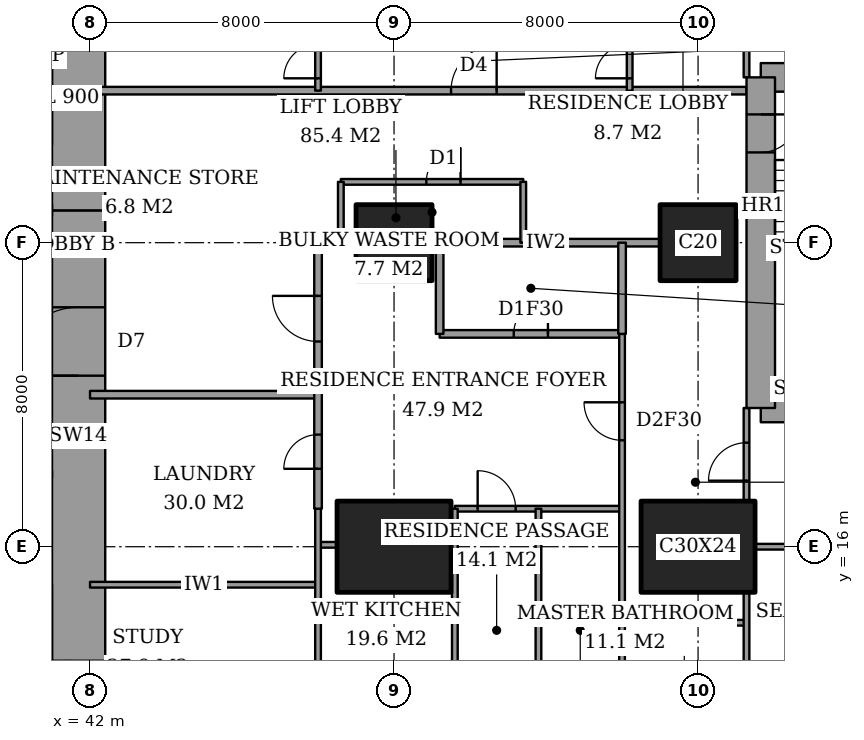
"""IFC4 building model, lengths in metres.
Left out: names, types, materials, properties, quantities, classifications, styles, units other than length and angle.
Written with IfcOpenShell. Run it as: python <this file> out.ifc"""

import sys

from ifc_helpers import new_model, si_unit, direction, frame, frame_2d, origin, origin_2d, place, context, subcontext, project, spatial, rectangle, extrude, element, fill, save


model = new_model("IFC4")
c1 = context("Model", 3, precision=1e-05, world=origin(), true_north=direction((0.0, 1.0)))
c2 = subcontext(c1, "Body", "Model", "MODEL_VIEW")
j1 = project(units=[si_unit("LENGTHUNIT", "METRE"), si_unit("PLANEANGLEUNIT", "RADIAN")], contexts=[c1])
p1 = place(None, origin())
s1 = spatial("IfcSite", under=j1, at=p1, CompositionType="ELEMENT")
p2 = place(p1, origin())
s2 = spatial("IfcBuilding", under=s1, at=p2, CompositionType="ELEMENT")
p3 = place(p2, frame((0.0, 0.0, 76.4)))
s3 = spatial("IfcBuildingStorey", under=s2, at=p3, CompositionType="ELEMENT", Elevation=76.4)
p4 = place(p3, frame((50.0, 16.0, 0.0), z_axis=(0.0, 0.0, 1.0), x_axis=(1.0, 0.0, 0.0)))
e1 = element("IfcColumn", 1, at=p4, inside=s3, PredefinedType="COLUMN", context=c2, shape_type="SweptSolid", body=[
    extrude(rectangle(XDim=3.0, YDim=2.4, at=origin_2d()), origin(), (0.0, 0.0, 1.0), 3.6),
])
p5 = place(p3, frame((50.0, 24.0, 0.0), z_axis=(0.0, 0.0, 1.0), x_axis=(1.0, 0.0, 0.0)))
e2 = element("IfcColumn", 2, at=p5, inside=s3, PredefinedType="COLUMN", context=c2, shape_type="SweptSolid", body=[
    extrude(rectangle(XDim=2.0, YDim=2.0, at=origin_2d()), origin(), (0.0, 0.0, 1.0), 3.6),
])
p6 = place(p3, frame((58.0, 16.0, 0.0), z_axis=(0.0, 0.0, 1.0), x_axis=(1.0, 0.0, 0.0)))
e3 = element("IfcColumn", 3, at=p6, inside=s3, PredefinedType="COLUMN", context=c2, shape_type="SweptSolid", body=[
    extrude(rectangle(XDim=3.0, YDim=2.4, at=origin_2d()), origin(), (0.0, 0.0, 1.0), 3.6),
])
p7 = place(p3, frame((58.0, 24.0, 0.0), z_axis=(0.0, 0.0, 1.0), x_axis=(1.0, 0.0, 0.0)))
e4 = element("IfcColumn", 4, at=p7, inside=s3, PredefinedType="COLUMN", context=c2, shape_type="SweptSolid", body=[
    extrude(rectangle(XDim=2.0, YDim=2.0, at=origin_2d()), origin(), (0.0, 0.0, 1.0), 3.6),
])
p8 = place(p3, frame((41.7, 13.0, 0.0), z_axis=(0.0, 0.0, 1.0), x_axis=(0.0, 1.0, 0.0)))
e5 = element("IfcWall", 5, at=p8, inside=s3, PredefinedType="SHEAR", context=c2, shape_type="SweptSolid", body=[
    extrude(rectangle(XDim=11.85, YDim=1.4, at=frame_2d((5.925, 0.0))), origin(), (0.0, 0.0, 1.0), 3.6),
])
p9 = place(p8, frame((7.5, 0.0, 0.0)))
e6 = element("IfcOpeningElement", 6, at=p9, cuts=e5, PredefinedType="OPENING", context=c2, shape_type="SweptSolid", body=[
    extrude(rectangle(XDim=1.8, YDim=2.4, at=frame_2d((0.9, 1.2))), frame((0.0, 0.71, 0.0), z_axis=(0.0, -1.0, 0.0), x_axis=(1.0, 0.0, 0.0)), (0.0, 0.0, 1.0), 1.42),
])
p10 = place(p3, frame((41.7, 24.85, 0.0), z_axis=(0.0, 0.0, 1.0), x_axis=(0.0, 1.0, 0.0)))
e7 = element("IfcWall", 7, at=p10, inside=s3, PredefinedType="SHEAR", context=c2, shape_type="SweptSolid", body=[
    extrude(rectangle(XDim=10.15, YDim=1.4, at=frame_2d((5.075, 0.0))), origin(), (0.0, 0.0, 1.0), 3.6),
])
for number, where, z_axis, x_axis in (
    (8, (59.65, 19.65, 0.0), (0.0, 0.0, 1.0), (1.0, 0.0, 0.0)),
    (9, (64.1, 28.35, 0.0), (0.0, 0.0, 1.0), (-1.0, 0.0, 0.0)),
):
    element("IfcWall", number, at=place(p3, frame(where, z_axis=z_axis, x_axis=x_axis)), inside=s3, PredefinedType="SHEAR", context=c2, shape_type="SweptSolid", body=[
        extrude(rectangle(XDim=4.45, YDim=0.75, at=frame_2d((2.225, 0.0))), origin(), (0.0, 0.0, 1.0), 3.6),
    ])
p11 = place(p3, frame((59.65, 28.35, 0.0), z_axis=(0.0, 0.0, 1.0), x_axis=(0.0, -1.0, 0.0)))
e10 = element("IfcWall", 10, at=p11, inside=s3, PredefinedType="SHEAR", context=c2, shape_type="SweptSolid", body=[
    extrude(rectangle(XDim=8.7, YDim=0.75, at=frame_2d((4.35, 0.0))), origin(), (0.0, 0.0, 1.0), 3.6),
])
p12 = place(p11, frame((0.975, 0.0, 0.0)))
e11 = element("IfcOpeningElement", 11, at=p12, cuts=e10, PredefinedType="OPENING", context=c2, shape_type="SweptSolid", body=[
    extrude(rectangle(XDim=1.0, YDim=2.1, at=frame_2d((0.5, 1.05))), frame((0.0, 0.385, 0.0), z_axis=(0.0, -1.0, 0.0), x_axis=(1.0, 0.0, 0.0)), (0.0, 0.0, 1.0), 0.77),
])
p13 = place(p3, frame((56.0, 14.0, 0.0), z_axis=(0.0, 0.0, 1.0), x_axis=(1.0, 0.0, 0.0)))
e12 = element("IfcWall", 12, at=p13, inside=s3, PredefinedType="PARTITIONING", context=c2, shape_type="SweptSolid", body=[
    extrude(rectangle(XDim=3.275, YDim=0.15, at=frame_2d((1.637, 0.0))), origin(), (0.0, 0.0, 1.0), 3.35),
])
p14 = place(p3, frame((42.0, 15.0, 0.0), z_axis=(0.0, 0.0, 1.0), x_axis=(1.0, 0.0, 0.0)))
e13 = element("IfcWall", 13, at=p14, inside=s3, PredefinedType="PARTITIONING", context=c2, shape_type="SweptSolid", body=[
    extrude(rectangle(XDim=6.0, YDim=0.15, at=frame_2d((3.0, 0.0))), origin(), (0.0, 0.0, 1.0), 3.35),
])
p15 = place(p3, frame((59.5, 16.0, 0.0), z_axis=(0.0, 0.0, 1.0), x_axis=(1.0, 0.0, 0.0)))
e14 = element("IfcWall", 14, at=p15, inside=s3, PredefinedType="PARTITIONING", context=c2, shape_type="SweptSolid", body=[
    extrude(rectangle(XDim=5.15, YDim=0.15, at=frame_2d((2.575, 0.0))), origin(), (0.0, 0.0, 1.0), 2.634),
])
p16 = place(p3, frame((48.0, 16.05, 0.0), z_axis=(0.0, 0.0, 1.0), x_axis=(1.0, 0.0, 0.0)))
e15 = element("IfcWall", 15, at=p16, inside=s3, PredefinedType="PARTITIONING", context=c2, shape_type="SweptSolid", body=[
    extrude(rectangle(XDim=0.5, YDim=0.15, at=frame_2d((0.25, 0.0))), origin(), (0.0, 0.0, 1.0), 2.634),
])
p17 = place(p3, frame((51.6, 17.0, 0.0), z_axis=(0.0, 0.0, 1.0), x_axis=(1.0, 0.0, 0.0)))
e16 = element("IfcWall", 16, at=p17, inside=s3, PredefinedType="PARTITIONING", context=c2, shape_type="SweptSolid", body=[
    extrude(rectangle(XDim=4.4, YDim=0.15, at=frame_2d((2.2, 0.0))), origin(), (0.0, 0.0, 1.0), 3.35),
])
p18 = place(p17, frame((0.6, 0.0, 0.0)))
e17 = element("IfcOpeningElement", 17, at=p18, cuts=e16, PredefinedType="OPENING", context=c2, shape_type="SweptSolid", body=[
    extrude(rectangle(XDim=1.0, YDim=2.1, at=frame_2d((0.5, 1.05))), frame((0.0, 0.085, 0.0), z_axis=(0.0, -1.0, 0.0), x_axis=(1.0, 0.0, 0.0)), (0.0, 0.0, 1.0), 0.17),
])
p19 = place(p3, frame((42.0, 20.0, 0.0), z_axis=(0.0, 0.0, 1.0), x_axis=(1.0, 0.0, 0.0)))
e18 = element("IfcWall", 18, at=p19, inside=s3, PredefinedType="PARTITIONING", context=c2, shape_type="SweptSolid", body=[
    extrude(rectangle(XDim=6.0, YDim=0.2, at=frame_2d((3.0, 0.0))), origin(), (0.0, 0.0, 1.0), 3.35),
])
p20 = place(p3, frame((51.2, 21.6, 0.0), z_axis=(0.0, 0.0, 1.0), x_axis=(1.0, 0.0, 0.0)))
e19 = element("IfcWall", 19, at=p20, inside=s3, PredefinedType="PARTITIONING", context=c2, shape_type="SweptSolid", body=[
    extrude(rectangle(XDim=4.8, YDim=0.2, at=frame_2d((2.4, 0.0))), origin(), (0.0, 0.0, 1.0), 3.35),
])
p21 = place(p20, frame((1.95, 0.0, 0.0)))
e20 = element("IfcOpeningElement", 20, at=p21, cuts=e19, PredefinedType="OPENING", context=c2, shape_type="SweptSolid", body=[
    extrude(rectangle(XDim=0.9, YDim=2.1, at=frame_2d((0.45, 1.05))), frame((0.0, 0.11, 0.0), z_axis=(0.0, -1.0, 0.0), x_axis=(1.0, 0.0, 0.0)), (0.0, 0.0, 1.0), 0.22),
])
p22 = place(p3, frame((48.0, 24.0, 0.0), z_axis=(0.0, 0.0, 1.0), x_axis=(1.0, 0.0, 0.0)))
e21 = element("IfcWall", 21, at=p22, inside=s3, PredefinedType="PARTITIONING", context=c2, shape_type="SweptSolid", body=[
    extrude(rectangle(XDim=1.0, YDim=0.2, at=frame_2d((0.5, 0.0))), origin(), (0.0, 0.0, 1.0), 3.35),
])
p23 = place(p3, frame((51.0, 24.0, 0.0), z_axis=(0.0, 0.0, 1.0), x_axis=(1.0, 0.0, 0.0)))
e22 = element("IfcWall", 22, at=p23, inside=s3, PredefinedType="PARTITIONING", context=c2, shape_type="SweptSolid", body=[
    extrude(rectangle(XDim=6.0, YDim=0.2, at=frame_2d((3.0, 0.0))), origin(), (0.0, 0.0, 1.0), 3.35),
])
p24 = place(p3, frame((48.6, 25.6, 0.0), z_axis=(0.0, 0.0, 1.0), x_axis=(1.0, 0.0, 0.0)))
e23 = element("IfcWall", 23, at=p24, inside=s3, PredefinedType="PARTITIONING", context=c2, shape_type="SweptSolid", body=[
    extrude(rectangle(XDim=4.8, YDim=0.15, at=frame_2d((2.4, 0.0))), origin(), (0.0, 0.0, 1.0), 3.35),
])
p25 = place(p24, frame((2.25, 0.0, 0.0)))
e24 = element("IfcOpeningElement", 24, at=p25, cuts=e23, PredefinedType="OPENING", context=c2, shape_type="SweptSolid", body=[
    extrude(rectangle(XDim=0.9, YDim=2.1, at=frame_2d((0.45, 1.05))), frame((0.0, 0.085, 0.0), z_axis=(0.0, -1.0, 0.0), x_axis=(1.0, 0.0, 0.0)), (0.0, 0.0, 1.0), 0.17),
])
p26 = place(p3, frame((42.0, 28.0, 0.0), z_axis=(0.0, 0.0, 1.0), x_axis=(1.0, 0.0, 0.0)))
e25 = element("IfcWall", 25, at=p26, inside=s3, PredefinedType="PARTITIONING", context=c2, shape_type="SweptSolid", body=[
    extrude(rectangle(XDim=17.275, YDim=0.2, at=frame_2d((8.637, 0.0))), origin(), (0.0, 0.0, 1.0), 3.35),
])
p27 = place(p26, frame((9.5, 0.0, 0.0)))
e26 = element("IfcOpeningElement", 26, at=p27, cuts=e25, PredefinedType="OPENING", context=c2, shape_type="SweptSolid", body=[
    extrude(rectangle(XDim=1.2, YDim=2.4, at=frame_2d((0.6, 1.2))), frame((0.0, 0.11, 0.0), z_axis=(0.0, -1.0, 0.0), x_axis=(1.0, 0.0, 0.0)), (0.0, 0.0, 1.0), 0.22),
])
p28 = place(p3, frame((48.0, 17.0, 0.0), z_axis=(0.0, 0.0, 1.0), x_axis=(0.0, 1.0, 0.0)))
e27 = element("IfcWall", 27, at=p28, inside=s3, PredefinedType="PARTITIONING", context=c2, shape_type="SweptSolid", body=[
    extrude(rectangle(XDim=7.0, YDim=0.2, at=frame_2d((3.5, 0.0))), origin(), (0.0, 0.0, 1.0), 3.35),
])
p29 = place(p28, frame((4.4, 0.0, 0.0)))
e28 = element("IfcOpeningElement", 28, at=p29, cuts=e27, PredefinedType="OPENING", context=c2, shape_type="SweptSolid", body=[
    extrude(rectangle(XDim=1.2, YDim=2.4, at=frame_2d((0.6, 1.2))), frame((0.0, 0.11, 0.0), z_axis=(0.0, -1.0, 0.0), x_axis=(1.0, 0.0, 0.0)), (0.0, 0.0, 1.0), 0.22),
])
p30 = place(p28, frame((1.05, 0.0, 0.0)))
e29 = element("IfcOpeningElement", 29, at=p30, cuts=e27, PredefinedType="OPENING", context=c2, shape_type="SweptSolid", body=[
    extrude(rectangle(XDim=0.9, YDim=2.1, at=frame_2d((0.45, 1.05))), frame((0.0, 0.11, 0.0), z_axis=(0.0, -1.0, 0.0), x_axis=(1.0, 0.0, 0.0)), (0.0, 0.0, 1.0), 0.22),
])
p31 = place(p3, frame((48.0, 10.6, 0.0), z_axis=(0.0, 0.0, 1.0), x_axis=(0.0, 1.0, 0.0)))
e30 = element("IfcWall", 30, at=p31, inside=s3, PredefinedType="PARTITIONING", context=c2, shape_type="SweptSolid", body=[
    extrude(rectangle(XDim=6.4, YDim=0.15, at=frame_2d((3.2, 0.0))), origin(), (0.0, 0.0, 1.0), 3.35),
])
p32 = place(p3, frame((48.0, 28.0, 0.0), z_axis=(0.0, 0.0, 1.0), x_axis=(0.0, 1.0, 0.0)))
e31 = element("IfcWall", 31, at=p32, inside=s3, PredefinedType="PARTITIONING", context=c2, shape_type="SweptSolid", body=[
    extrude(rectangle(XDim=9.4, YDim=0.15, at=frame_2d((4.7, 0.0))), origin(), (0.0, 0.0, 1.0), 3.35),
])
p33 = place(p32, frame((0.325, 0.0, 0.0)))
e32 = element("IfcOpeningElement", 32, at=p33, cuts=e31, PredefinedType="OPENING", context=c2, shape_type="SweptSolid", body=[
    extrude(rectangle(XDim=0.9, YDim=2.1, at=frame_2d((0.45, 1.05))), frame((0.0, 0.085, 0.0), z_axis=(0.0, -1.0, 0.0), x_axis=(1.0, 0.0, 0.0)), (0.0, 0.0, 1.0), 0.17),
])
p34 = place(p3, frame((48.6, 24.0, 0.0), z_axis=(0.0, 0.0, 1.0), x_axis=(0.0, 1.0, 0.0)))
e33 = element("IfcWall", 33, at=p34, inside=s3, PredefinedType="PARTITIONING", context=c2, shape_type="SweptSolid", body=[
    extrude(rectangle(XDim=1.6, YDim=0.15, at=frame_2d((0.8, 0.0))), origin(), (0.0, 0.0, 1.0), 3.35),
])
p35 = place(p3, frame((51.2, 21.6, 0.0), z_axis=(0.0, 0.0, 1.0), x_axis=(0.0, 1.0, 0.0)))
e34 = element("IfcWall", 34, at=p35, inside=s3, PredefinedType="PARTITIONING", context=c2, shape_type="SweptSolid", body=[
    extrude(rectangle(XDim=2.4, YDim=0.2, at=frame_2d((1.2, 0.0))), origin(), (0.0, 0.0, 1.0), 3.35),
])
p36 = place(p3, frame((51.6, 10.6, 0.0), z_axis=(0.0, 0.0, 1.0), x_axis=(0.0, 1.0, 0.0)))
e35 = element("IfcWall", 35, at=p36, inside=s3, PredefinedType="PARTITIONING", context=c2, shape_type="SweptSolid", body=[
    extrude(rectangle(XDim=6.4, YDim=0.15, at=frame_2d((3.2, 0.0))), origin(), (0.0, 0.0, 1.0), 3.35),
])
p37 = place(p3, frame((53.4, 24.0, 0.0), z_axis=(0.0, 0.0, 1.0), x_axis=(0.0, 1.0, 0.0)))
e36 = element("IfcWall", 36, at=p37, inside=s3, PredefinedType="PARTITIONING", context=c2, shape_type="SweptSolid", body=[
    extrude(rectangle(XDim=1.6, YDim=0.15, at=frame_2d((0.8, 0.0))), origin(), (0.0, 0.0, 1.0), 3.35),
])
p38 = place(p3, frame((53.8, 10.6, 0.0), z_axis=(0.0, 0.0, 1.0), x_axis=(0.0, 1.0, 0.0)))
e37 = element("IfcWall", 37, at=p38, inside=s3, PredefinedType="PARTITIONING", context=c2, shape_type="SweptSolid", body=[
    extrude(rectangle(XDim=6.4, YDim=0.15, at=frame_2d((3.2, 0.0))), origin(), (0.0, 0.0, 1.0), 3.35),
])
p39 = place(p3, frame((56.0, 21.6, 0.0), z_axis=(0.0, 0.0, 1.0), x_axis=(0.0, 1.0, 0.0)))
e38 = element("IfcWall", 38, at=p39, inside=s3, PredefinedType="PARTITIONING", context=c2, shape_type="SweptSolid", body=[
    extrude(rectangle(XDim=2.4, YDim=0.2, at=frame_2d((1.2, 0.0))), origin(), (0.0, 0.0, 1.0), 3.35),
])
p40 = place(p3, frame((56.0, 10.6, 0.0), z_axis=(0.0, 0.0, 1.0), x_axis=(0.0, 1.0, 0.0)))
e39 = element("IfcWall", 39, at=p40, inside=s3, PredefinedType="PARTITIONING", context=c2, shape_type="SweptSolid", body=[
    extrude(rectangle(XDim=11.0, YDim=0.15, at=frame_2d((5.5, 0.0))), origin(), (0.0, 0.0, 1.0), 3.35),
])
p41 = place(p40, frame((8.2, 0.0, 0.0)))
e40 = element("IfcOpeningElement", 40, at=p41, cuts=e39, PredefinedType="OPENING", context=c2, shape_type="SweptSolid", body=[
    extrude(rectangle(XDim=1.0, YDim=2.1, at=frame_2d((0.5, 1.05))), frame((0.0, 0.085, 0.0), z_axis=(0.0, -1.0, 0.0), x_axis=(1.0, 0.0, 0.0)), (0.0, 0.0, 1.0), 0.17),
])
p42 = place(p3, frame((56.2, 28.0, 0.0), z_axis=(0.0, 0.0, 1.0), x_axis=(0.0, 1.0, 0.0)))
e41 = element("IfcWall", 41, at=p42, inside=s3, PredefinedType="PARTITIONING", context=c2, shape_type="SweptSolid", body=[
    extrude(rectangle(XDim=9.4, YDim=0.15, at=frame_2d((4.7, 0.0))), origin(), (0.0, 0.0, 1.0), 3.35),
])
p43 = place(p42, frame((0.325, 0.0, 0.0)))
e42 = element("IfcOpeningElement", 42, at=p43, cuts=e41, PredefinedType="OPENING", context=c2, shape_type="SweptSolid", body=[
    extrude(rectangle(XDim=0.9, YDim=2.1, at=frame_2d((0.45, 1.05))), frame((0.0, 0.085, 0.0), z_axis=(0.0, -1.0, 0.0), x_axis=(1.0, 0.0, 0.0)), (0.0, 0.0, 1.0), 0.17),
])
p44 = place(p3, frame((59.275, 10.6, 0.0), z_axis=(0.0, 0.0, 1.0), x_axis=(0.0, 1.0, 0.0)))
e43 = element("IfcWall", 43, at=p44, inside=s3, PredefinedType="PARTITIONING", context=c2, shape_type="SweptSolid", body=[
    extrude(rectangle(XDim=4.2, YDim=0.15, at=frame_2d((2.1, 0.0))), origin(), (0.0, 0.0, 1.0), 3.35),
])
p45 = place(p3, frame((59.275, 17.2, 0.0), z_axis=(0.0, 0.0, 1.0), x_axis=(0.0, 1.0, 0.0)))
e44 = element("IfcWall", 44, at=p45, inside=s3, PredefinedType="PARTITIONING", context=c2, shape_type="SweptSolid", body=[
    extrude(rectangle(XDim=2.45, YDim=0.15, at=frame_2d((1.225, 0.0))), origin(), (0.0, 0.0, 1.0), 3.35),
])
p46 = place(p45, frame((0.538, 0.0, 0.0)))
e45 = element("IfcOpeningElement", 45, at=p46, cuts=e44, PredefinedType="OPENING", context=c2, shape_type="SweptSolid", body=[
    extrude(rectangle(XDim=1.0, YDim=2.1, at=frame_2d((0.5, 1.05))), frame((0.0, 0.085, 0.0), z_axis=(0.0, -1.0, 0.0), x_axis=(1.0, 0.0, 0.0)), (0.0, 0.0, 1.0), 0.17),
])
p47 = place(p3, frame((59.275, 28.35, 0.0), z_axis=(0.0, 0.0, 1.0), x_axis=(0.0, 1.0, 0.0)))
e46 = element("IfcWall", 46, at=p47, inside=s3, PredefinedType="PARTITIONING", context=c2, shape_type="SweptSolid", body=[
    extrude(rectangle(XDim=2.45, YDim=0.15, at=frame_2d((1.225, 0.0))), origin(), (0.0, 0.0, 1.0), 3.35),
])
p48 = place(p47, frame((0.913, 0.0, 0.0)))
e47 = element("IfcOpeningElement", 47, at=p48, cuts=e46, PredefinedType="OPENING", context=c2, shape_type="SweptSolid", body=[
    extrude(rectangle(XDim=1.0, YDim=2.1, at=frame_2d((0.5, 1.05))), frame((0.0, 0.085, 0.0), z_axis=(0.0, -1.0, 0.0), x_axis=(1.0, 0.0, 0.0)), (0.0, 0.0, 1.0), 0.17),
])
p49 = place(p3, frame((28.3, 17.9, 0.0), z_axis=(0.0, 0.0, 1.0), x_axis=(1.0, 0.0, 0.0)))
e48 = element("IfcWall", 48, at=p49, inside=s3, PredefinedType="PARTITIONING", context=c2, shape_type="SweptSolid", body=[
    extrude(rectangle(XDim=12.7, YDim=0.2, at=frame_2d((6.35, 0.0))), origin(), (0.0, 0.0, 1.0), 3.6),
])
p50 = place(p49, frame((0.95, 0.0, 0.0)))
e49 = element("IfcOpeningElement", 49, at=p50, cuts=e48, PredefinedType="OPENING", context=c2, shape_type="SweptSolid", body=[
    extrude(rectangle(XDim=1.1, YDim=2.1, at=frame_2d((0.55, 1.05))), frame((0.0, 0.11, 0.0), z_axis=(0.0, -1.0, 0.0), x_axis=(1.0, 0.0, 0.0)), (0.0, 0.0, 1.0), 0.22),
])
p51 = place(p49, frame((4.15, 0.0, 0.0)))
e50 = element("IfcOpeningElement", 50, at=p51, cuts=e48, PredefinedType="OPENING", context=c2, shape_type="SweptSolid", body=[
    extrude(rectangle(XDim=1.1, YDim=2.1, at=frame_2d((0.55, 1.05))), frame((0.0, 0.11, 0.0), z_axis=(0.0, -1.0, 0.0), x_axis=(1.0, 0.0, 0.0)), (0.0, 0.0, 1.0), 0.22),
])
p52 = place(p49, frame((7.35, 0.0, 0.0)))
e51 = element("IfcOpeningElement", 51, at=p52, cuts=e48, PredefinedType="OPENING", context=c2, shape_type="SweptSolid", body=[
    extrude(rectangle(XDim=1.1, YDim=2.1, at=frame_2d((0.55, 1.05))), frame((0.0, 0.11, 0.0), z_axis=(0.0, -1.0, 0.0), x_axis=(1.0, 0.0, 0.0)), (0.0, 0.0, 1.0), 0.22),
])
p53 = place(p49, frame((10.6, 0.0, 0.0)))
e52 = element("IfcOpeningElement", 52, at=p53, cuts=e48, PredefinedType="OPENING", context=c2, shape_type="SweptSolid", body=[
    extrude(rectangle(XDim=1.2, YDim=2.1, at=frame_2d((0.6, 1.05))), frame((0.0, 0.11, 0.0), z_axis=(0.0, -1.0, 0.0), x_axis=(1.0, 0.0, 0.0)), (0.0, 0.0, 1.0), 0.22),
])
p54 = place(p46, origin())
e53 = element("IfcDoor", 53, at=p54, inside=s3, OperationType="SINGLE_SWING_RIGHT", PredefinedType="DOOR", context=c2, shape_type="SweptSolid", body=[
    extrude(rectangle(XDim=1.0, YDim=2.1, at=frame_2d((0.5, 1.05))), frame((0.0, 0.025, 0.0), z_axis=(0.0, -1.0, 0.0), x_axis=(1.0, 0.0, 0.0)), (0.0, 0.0, 1.0), 0.05),
])
fill(e45, e53)
p55 = place(p41, origin())
e54 = element("IfcDoor", 54, at=p55, inside=s3, OperationType="SINGLE_SWING_LEFT", PredefinedType="DOOR", context=c2, shape_type="SweptSolid", body=[
    extrude(rectangle(XDim=1.0, YDim=2.1, at=frame_2d((0.5, 1.05))), frame((0.0, 0.025, 0.0), z_axis=(0.0, -1.0, 0.0), x_axis=(1.0, 0.0, 0.0)), (0.0, 0.0, 1.0), 0.05),
])
fill(e40, e54)
p56 = place(p21, origin())
e55 = element("IfcDoor", 55, at=p56, inside=s3, OperationType="SINGLE_SWING_LEFT", PredefinedType="DOOR", context=c2, shape_type="SweptSolid", body=[
    extrude(rectangle(XDim=0.9, YDim=2.1, at=frame_2d((0.45, 1.05))), frame((0.0, 0.025, 0.0), z_axis=(0.0, -1.0, 0.0), x_axis=(1.0, 0.0, 0.0)), (0.0, 0.0, 1.0), 0.05),
])
fill(e20, e55)
p57 = place(p29, origin())
e56 = element("IfcDoor", 56, at=p57, inside=s3, OperationType="SINGLE_SWING_LEFT", PredefinedType="DOOR", context=c2, shape_type="SweptSolid", body=[
    extrude(rectangle(XDim=1.2, YDim=2.4, at=frame_2d((0.6, 1.2))), frame((0.0, 0.025, 0.0), z_axis=(0.0, -1.0, 0.0), x_axis=(1.0, 0.0, 0.0)), (0.0, 0.0, 1.0), 0.05),
])
fill(e28, e56)
p58 = place(p18, origin())
e57 = element("IfcDoor", 57, at=p58, inside=s3, OperationType="SINGLE_SWING_RIGHT", PredefinedType="DOOR", context=c2, shape_type="SweptSolid", body=[
    extrude(rectangle(XDim=1.0, YDim=2.1, at=frame_2d((0.5, 1.05))), frame((0.0, 0.025, 0.0), z_axis=(0.0, -1.0, 0.0), x_axis=(1.0, 0.0, 0.0)), (0.0, 0.0, 1.0), 0.05),
])
fill(e17, e57)
p59 = place(p30, origin())
e58 = element("IfcDoor", 58, at=p59, inside=s3, OperationType="SINGLE_SWING_RIGHT", PredefinedType="DOOR", context=c2, shape_type="SweptSolid", body=[
    extrude(rectangle(XDim=0.9, YDim=2.1, at=frame_2d((0.45, 1.05))), frame((0.0, 0.025, 0.0), z_axis=(0.0, -1.0, 0.0), x_axis=(1.0, 0.0, 0.0)), (0.0, 0.0, 1.0), 0.05),
])
fill(e29, e58)
p60 = place(p43, origin())
e59 = element("IfcDoor", 59, at=p60, inside=s3, OperationType="SINGLE_SWING_RIGHT", PredefinedType="DOOR", context=c2, shape_type="SweptSolid", body=[
    extrude(rectangle(XDim=0.9, YDim=2.1, at=frame_2d((0.45, 1.05))), frame((0.0, 0.025, 0.0), z_axis=(0.0, -1.0, 0.0), x_axis=(1.0, 0.0, 0.0)), (0.0, 0.0, 1.0), 0.05),
])
fill(e42, e59)
p61 = place(p27, origin())
e60 = element("IfcDoor", 60, at=p61, inside=s3, OperationType="SINGLE_SWING_LEFT", PredefinedType="DOOR", context=c2, shape_type="SweptSolid", body=[
    extrude(rectangle(XDim=1.2, YDim=2.4, at=frame_2d((0.6, 1.2))), frame((0.0, 0.025, 0.0), z_axis=(0.0, -1.0, 0.0), x_axis=(1.0, 0.0, 0.0)), (0.0, 0.0, 1.0), 0.05),
])
fill(e26, e60)
p62 = place(p33, origin())
e61 = element("IfcDoor", 61, at=p62, inside=s3, OperationType="SINGLE_SWING_RIGHT", PredefinedType="DOOR", context=c2, shape_type="SweptSolid", body=[
    extrude(rectangle(XDim=0.9, YDim=2.1, at=frame_2d((0.45, 1.05))), frame((0.0, 0.025, 0.0), z_axis=(0.0, -1.0, 0.0), x_axis=(1.0, 0.0, 0.0)), (0.0, 0.0, 1.0), 0.05),
])
fill(e32, e61)
p63 = place(p25, origin())
e62 = element("IfcDoor", 62, at=p63, inside=s3, OperationType="SINGLE_SWING_LEFT", PredefinedType="DOOR", context=c2, shape_type="SweptSolid", body=[
    extrude(rectangle(XDim=0.9, YDim=2.1, at=frame_2d((0.45, 1.05))), frame((0.0, 0.025, 0.0), z_axis=(0.0, -1.0, 0.0), x_axis=(1.0, 0.0, 0.0)), (0.0, 0.0, 1.0), 0.05),
])
fill(e24, e62)
p64 = place(p9, origin())
e63 = element("IfcDoor", 63, at=p64, inside=s3, OperationType="DOUBLE_DOOR_DOUBLE_SWING", PredefinedType="DOOR", context=c2, shape_type="SweptSolid", body=[
    extrude(rectangle(XDim=1.8, YDim=2.4, at=frame_2d((0.9, 1.2))), frame((0.0, 0.025, 0.0), z_axis=(0.0, -1.0, 0.0), x_axis=(1.0, 0.0, 0.0)), (0.0, 0.0, 1.0), 0.05),
])
fill(e6, e63)
p65 = place(p12, origin())
e64 = element("IfcDoor", 64, at=p65, inside=s3, OperationType="SINGLE_SWING_RIGHT", PredefinedType="DOOR", context=c2, shape_type="SweptSolid", body=[
    extrude(rectangle(XDim=1.0, YDim=2.1, at=frame_2d((0.5, 1.05))), frame((0.0, 0.025, 0.0), z_axis=(0.0, -1.0, 0.0), x_axis=(1.0, 0.0, 0.0)), (0.0, 0.0, 1.0), 0.05),
])
fill(e11, e64)
save(model, sys.argv[1])
